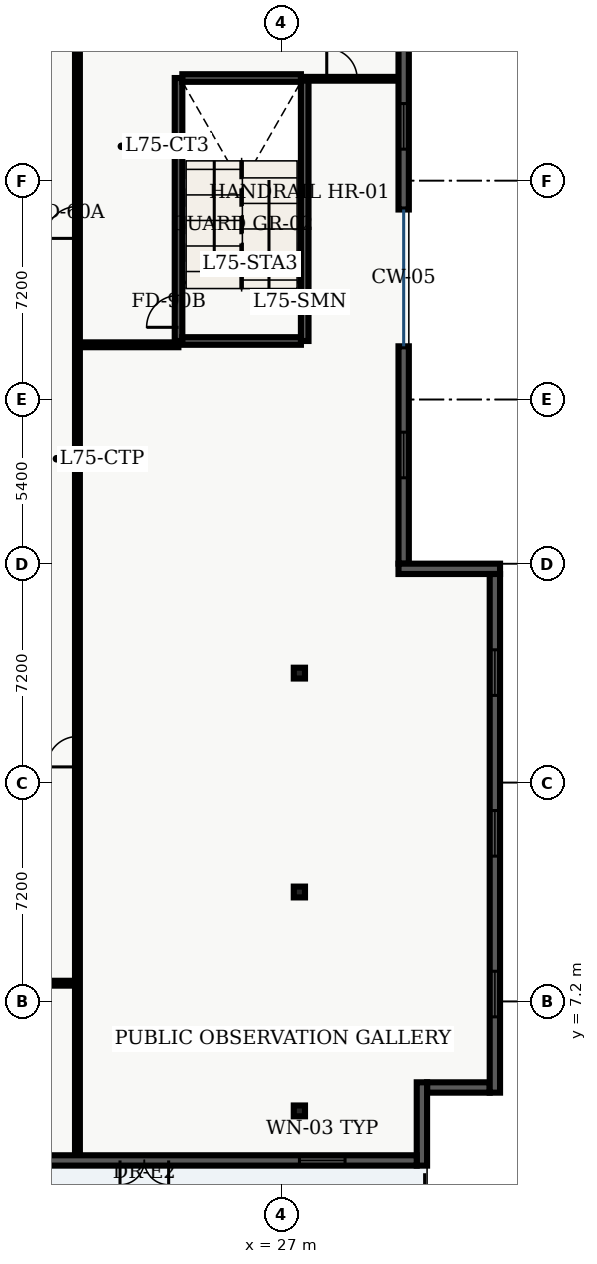
"""IFC4 building model, lengths in metres.
Left out: names, types, materials, properties, quantities, classifications, styles, units other than length and angle.
Written with IfcOpenShell. Run it as: python <this file> out.ifc"""

import sys

from ifc_helpers import new_model, entity, si_unit, converted_unit, direction, frame, origin_with_axes, origin_2d_with_axis, place, context, subcontext, project, spatial, polyline, rectangle, i_section, outline, extrude, element, fill, save


model = new_model("IFC4")
c1 = context("Model", 3, precision=1e-05, world=origin_with_axes(), true_north=direction((0.0, 1.0)))
c2 = subcontext(c1, "Body", "Model", "MODEL_VIEW")
j1 = project(units=[si_unit("LENGTHUNIT", "METRE"), converted_unit("PLANEANGLEUNIT", "DEGREE", entity("IfcPlaneAngleMeasure", 0.017), si_unit("PLANEANGLEUNIT", "RADIAN"), dimensions=[0, 0, 0, 0, 0, 0, 0])], contexts=[c1])
p1 = place(None, origin_with_axes())
s1 = spatial("IfcSite", under=j1, at=p1, CompositionType="ELEMENT")
p2 = place(p1, origin_with_axes())
s2 = spatial("IfcBuilding", under=s1, at=p2, CompositionType="ELEMENT")
p3 = place(p2, frame((0.0, 0.0, 303.6), z_axis=(0.0, 0.0, 1.0), x_axis=(1.0, 0.0, 0.0)))
s3 = spatial("IfcBuildingStorey", under=s2, at=p3, CompositionType="ELEMENT", Elevation=303.6)
p4 = place(p3, frame((23.625, 28.925, 0.0), z_axis=(0.0, 0.0, 1.0), x_axis=(0.0, 1.0, 0.0)))
e1 = element("IfcWall", 1, at=p4, inside=s3, PredefinedType="SHEAR", context=c2, shape_type="SweptSolid", body=[
    extrude(outline(polyline([(0.0, -0.125), (8.65, -0.125), (8.65, 0.125), (0.0, 0.125), (0.0, -0.125)])), origin_with_axes(), (0.0, 0.0, 1.0), 4.84),
])
p5 = place(p4, frame((0.975, 0.0, 0.0), z_axis=(0.0, 0.0, 1.0), x_axis=(1.0, 0.0, 0.0)))
e2 = element("IfcOpeningElement", 2, at=p5, cuts=e1, PredefinedType="OPENING", context=c2, shape_type="SweptSolid", body=[
    extrude(rectangle(XDim=1.05, YDim=0.27, at=origin_2d_with_axis()), origin_with_axes(), (0.0, 0.0, 1.0), 2.15),
])
p6 = place(p3, frame((27.775, 28.925, 0.0), z_axis=(0.0, 0.0, 1.0), x_axis=(0.0, 1.0, 0.0)))
e3 = element("IfcWall", 3, at=p6, inside=s3, PredefinedType="SHEAR", context=c2, shape_type="SweptSolid", body=[
    extrude(outline(polyline([(0.0, -0.125), (8.65, -0.125), (8.65, 0.125), (0.0, 0.125), (0.0, -0.125)])), origin_with_axes(), (0.0, 0.0, 1.0), 4.84),
])
for number, where, z_axis, x_axis in (
    (4, (23.75, 28.925, 0.0), (0.0, 0.0, 1.0), (1.0, 0.0, 0.0)),
    (5, (23.75, 37.575, 0.0), (0.0, 0.0, 1.0), (1.0, 0.0, 0.0)),
):
    element("IfcWall", number, at=place(p3, frame(where, z_axis=z_axis, x_axis=x_axis)), inside=s3, PredefinedType="SHEAR", context=c2, shape_type="SweptSolid", body=[
        extrude(outline(polyline([(0.0, -0.125), (3.9, -0.125), (3.9, 0.125), (0.0, 0.125), (0.0, -0.125)])), origin_with_axes(), (0.0, 0.0, 1.0), 4.84),
    ])
for number, where, z_axis, x_axis in (
    (6, (27.6, 3.6, 0.0), (0.0, 0.0, 1.0), (1.0, 0.0, 0.0)),
    (7, (27.6, 10.8, 0.0), (0.0, 0.0, 1.0), (1.0, 0.0, 0.0)),
    (8, (27.6, 18.0, 0.0), (0.0, 0.0, 1.0), (1.0, 0.0, 0.0)),
):
    element("IfcColumn", number, at=place(p3, frame(where, z_axis=z_axis, x_axis=x_axis)), inside=s3, PredefinedType="COLUMN", context=c2, shape_type="SweptSolid", body=[
        extrude(i_section(OverallWidth=0.369, OverallDepth=0.356, WebThickness=0.011, FlangeThickness=0.018, FilletRadius=0.018, at=origin_2d_with_axis()), origin_with_axes(), (0.0, 0.0, 1.0), 5.1),
    ])
p7 = place(p3, frame((8.135, 7.8, 0.0), z_axis=(0.0, 0.0, 1.0), x_axis=(1.0, 0.0, 0.0)))
e9 = element("IfcWall", 9, at=p7, inside=s3, PredefinedType="PARTITIONING", context=c2, shape_type="SweptSolid", body=[
    extrude(outline(polyline([(0.0, -0.08), (12.165, -0.08), (12.165, 0.08), (0.0, 0.08), (0.0, -0.08)])), origin_with_axes(), (0.0, 0.0, 1.0), 3.2),
])
p8 = place(p7, frame((6.065, 0.0, 0.0), z_axis=(0.0, 0.0, 1.0), x_axis=(1.0, 0.0, 0.0)))
e10 = element("IfcOpeningElement", 10, at=p8, cuts=e9, PredefinedType="OPENING", context=c2, shape_type="SweptSolid", body=[
    extrude(rectangle(XDim=1.0, YDim=0.18, at=origin_2d_with_axis()), origin_with_axes(), (0.0, 0.0, 1.0), 2.15),
])
p9 = place(p3, frame((20.3, 2.14, 0.0), z_axis=(0.0, 0.0, 1.0), x_axis=(0.0, 1.0, 0.0)))
e11 = element("IfcWall", 11, at=p9, inside=s3, PredefinedType="PARTITIONING", context=c2, shape_type="SweptSolid", body=[
    extrude(outline(polyline([(0.0, -0.08), (38.36, -0.08), (38.36, 0.08), (0.0, 0.08), (0.0, -0.08)])), origin_with_axes(), (0.0, 0.0, 1.0), 3.2),
])
p10 = place(p9, frame((30.685, 0.0, 0.0), z_axis=(0.0, 0.0, 1.0), x_axis=(1.0, 0.0, 0.0)))
e12 = element("IfcOpeningElement", 12, at=p10, cuts=e11, PredefinedType="OPENING", context=c2, shape_type="SweptSolid", body=[
    extrude(rectangle(XDim=1.05, YDim=0.18, at=origin_2d_with_axis()), origin_with_axes(), (0.0, 0.0, 1.0), 2.15),
])
p11 = place(p9, frame((13.275, 0.0, 0.0), z_axis=(0.0, 0.0, 1.0), x_axis=(1.0, 0.0, 0.0)))
e13 = element("IfcOpeningElement", 13, at=p11, cuts=e11, PredefinedType="OPENING", context=c2, shape_type="SweptSolid", body=[
    extrude(rectangle(XDim=1.0, YDim=0.18, at=origin_2d_with_axis()), origin_with_axes(), (0.0, 0.0, 1.0), 2.15),
])
p12 = place(p3, frame((20.3, 28.8, 0.0), z_axis=(0.0, 0.0, 1.0), x_axis=(1.0, 0.0, 0.0)))
e14 = element("IfcWall", 14, at=p12, inside=s3, PredefinedType="PARTITIONING", context=c2, shape_type="SweptSolid", body=[
    extrude(outline(polyline([(0.0, -0.08), (3.32, -0.08), (3.32, 0.08), (0.0, 0.08), (0.0, -0.08)])), origin_with_axes(), (0.0, 0.0, 1.0), 3.2),
])
p13 = place(p3, frame((27.85, 37.55, 0.0), z_axis=(0.0, 0.0, 1.0), x_axis=(1.0, 0.0, 0.0)))
e15 = element("IfcWall", 15, at=p13, inside=s3, PredefinedType="PARTITIONING", context=c2, shape_type="SweptSolid", body=[
    extrude(outline(polyline([(0.0, -0.062), (3.015, -0.062), (3.015, 0.062), (0.0, 0.062), (0.0, -0.062)])), origin_with_axes(), (0.0, 0.0, 1.0), 3.2),
])
p14 = place(p13, frame((1.15, 0.0, 0.0), z_axis=(0.0, 0.0, 1.0), x_axis=(1.0, 0.0, 0.0)))
e16 = element("IfcOpeningElement", 16, at=p14, cuts=e15, PredefinedType="OPENING", context=c2, shape_type="SweptSolid", body=[
    extrude(rectangle(XDim=1.0, YDim=0.145, at=origin_2d_with_axis()), origin_with_axes(), (0.0, 0.0, 1.0), 2.15),
])
p15 = place(p3, frame((33.86, 4.37, 0.0), z_axis=(0.0, 0.0, 1.0), x_axis=(-1.0, 0.0, 0.0)))
e17 = element("IfcWall", 17, at=p15, inside=s3, PredefinedType="SOLIDWALL", context=c2, shape_type="SweptSolid", body=[
    extrude(outline(polyline([(0.0, -0.17), (2.06, -0.17), (2.06, 0.17), (0.0, 0.17), (0.0, -0.17)])), origin_with_axes(), (0.0, 0.0, 1.0), 4.84),
])
p16 = place(p3, frame((31.63, 4.54, 0.0), z_axis=(0.0, 0.0, 1.0), x_axis=(0.0, -1.0, 0.0)))
e18 = element("IfcWall", 18, at=p16, inside=s3, PredefinedType="SOLIDWALL", context=c2, shape_type="SweptSolid", body=[
    extrude(outline(polyline([(0.0, -0.17), (2.74, -0.17), (2.74, 0.17), (0.0, 0.17), (0.0, -0.17)])), origin_with_axes(), (0.0, 0.0, 1.0), 4.84),
])
p17 = place(p3, frame((31.46, 1.97, 0.0), z_axis=(0.0, 0.0, 1.0), x_axis=(-1.0, 0.0, 0.0)))
e19 = element("IfcWall", 19, at=p17, inside=s3, PredefinedType="SOLIDWALL", context=c2, shape_type="SweptSolid", body=[
    extrude(outline(polyline([(0.0, -0.17), (21.26, -0.17), (21.26, 0.17), (0.0, 0.17), (0.0, -0.17)])), origin_with_axes(), (0.0, 0.0, 1.0), 4.84),
])
p18 = place(p17, frame((8.96, 0.0, 0.0), z_axis=(0.0, 0.0, 1.0), x_axis=(1.0, 0.0, 0.0)))
e20 = element("IfcOpeningElement", 20, at=p18, cuts=e19, PredefinedType="OPENING", context=c2, shape_type="SweptSolid", body=[
    extrude(rectangle(XDim=1.6, YDim=0.36, at=origin_2d_with_axis()), origin_with_axes(), (0.0, 0.0, 1.0), 2.2),
])
p19 = place(p17, frame((3.108, 0.0, 0.45), z_axis=(0.0, 0.0, 1.0), x_axis=(1.0, 0.0, 0.0)))
e21 = element("IfcOpeningElement", 21, at=p19, cuts=e19, PredefinedType="OPENING", context=c2, shape_type="SweptSolid", body=[
    extrude(rectangle(XDim=1.5, YDim=0.36, at=origin_2d_with_axis()), origin_with_axes(), (0.0, 0.0, 1.0), 2.1),
])
p20 = place(p17, frame((13.138, 0.0, 0.45), z_axis=(0.0, 0.0, 1.0), x_axis=(1.0, 0.0, 0.0)))
e22 = element("IfcOpeningElement", 22, at=p20, cuts=e19, PredefinedType="OPENING", context=c2, shape_type="SweptSolid", body=[
    extrude(rectangle(XDim=1.5, YDim=0.36, at=origin_2d_with_axis()), origin_with_axes(), (0.0, 0.0, 1.0), 2.1),
])
p21 = place(p17, frame((18.153, 0.0, 0.45), z_axis=(0.0, 0.0, 1.0), x_axis=(1.0, 0.0, 0.0)))
e23 = element("IfcOpeningElement", 23, at=p21, cuts=e19, PredefinedType="OPENING", context=c2, shape_type="SweptSolid", body=[
    extrude(rectangle(XDim=1.5, YDim=0.36, at=origin_2d_with_axis()), origin_with_axes(), (0.0, 0.0, 1.0), 2.1),
])
p22 = place(p3, frame((31.03, 40.42, 0.0), z_axis=(0.0, 0.0, 1.0), x_axis=(0.0, -1.0, 0.0)))
e24 = element("IfcWall", 24, at=p22, inside=s3, PredefinedType="SOLIDWALL", context=c2, shape_type="SweptSolid", body=[
    extrude(outline(polyline([(0.0, -0.17), (7.17, -0.17), (7.17, 0.17), (0.0, 0.17), (0.0, -0.17)])), origin_with_axes(), (0.0, 0.0, 1.0), 4.84),
])
p23 = place(p22, frame((4.435, 0.0, 0.45), z_axis=(0.0, 0.0, 1.0), x_axis=(1.0, 0.0, 0.0)))
e25 = element("IfcOpeningElement", 25, at=p23, cuts=e24, PredefinedType="OPENING", context=c2, shape_type="SweptSolid", body=[
    extrude(rectangle(XDim=1.5, YDim=0.36, at=origin_2d_with_axis()), origin_with_axes(), (0.0, 0.0, 1.0), 2.1),
])
p24 = place(p3, frame((31.03, 28.75, 0.0), z_axis=(0.0, 0.0, 1.0), x_axis=(0.0, -1.0, 0.0)))
e26 = element("IfcWall", 26, at=p24, inside=s3, PredefinedType="SOLIDWALL", context=c2, shape_type="SweptSolid", body=[
    extrude(outline(polyline([(0.0, -0.17), (7.15, -0.17), (7.15, 0.17), (0.0, 0.17), (0.0, -0.17)])), origin_with_axes(), (0.0, 0.0, 1.0), 4.84),
])
p25 = place(p24, frame((3.575, 0.0, 0.45), z_axis=(0.0, 0.0, 1.0), x_axis=(1.0, 0.0, 0.0)))
e27 = element("IfcOpeningElement", 27, at=p25, cuts=e26, PredefinedType="OPENING", context=c2, shape_type="SweptSolid", body=[
    extrude(rectangle(XDim=1.5, YDim=0.36, at=origin_2d_with_axis()), origin_with_axes(), (0.0, 0.0, 1.0), 2.1),
])
p26 = place(p3, frame((30.86, 21.43, 0.0), z_axis=(0.0, 0.0, 1.0), x_axis=(1.0, 0.0, 0.0)))
e28 = element("IfcWall", 28, at=p26, inside=s3, PredefinedType="SOLIDWALL", context=c2, shape_type="SweptSolid", body=[
    extrude(outline(polyline([(0.0, -0.17), (3.34, -0.17), (3.34, 0.17), (0.0, 0.17), (0.0, -0.17)])), origin_with_axes(), (0.0, 0.0, 1.0), 4.84),
])
p27 = place(p3, frame((34.03, 21.26, 0.0), z_axis=(0.0, 0.0, 1.0), x_axis=(0.0, -1.0, 0.0)))
e29 = element("IfcWall", 29, at=p27, inside=s3, PredefinedType="SOLIDWALL", context=c2, shape_type="SweptSolid", body=[
    extrude(outline(polyline([(0.0, -0.17), (17.06, -0.17), (17.06, 0.17), (0.0, 0.17), (0.0, -0.17)])), origin_with_axes(), (0.0, 0.0, 1.0), 4.84),
])
p28 = place(p27, frame((3.243, 0.0, 0.45), z_axis=(0.0, 0.0, 1.0), x_axis=(1.0, 0.0, 0.0)))
e30 = element("IfcOpeningElement", 30, at=p28, cuts=e29, PredefinedType="OPENING", context=c2, shape_type="SweptSolid", body=[
    extrude(rectangle(XDim=1.5, YDim=0.36, at=origin_2d_with_axis()), origin_with_axes(), (0.0, 0.0, 1.0), 2.1),
])
p29 = place(p27, frame((8.53, 0.0, 0.45), z_axis=(0.0, 0.0, 1.0), x_axis=(1.0, 0.0, 0.0)))
e31 = element("IfcOpeningElement", 31, at=p29, cuts=e29, PredefinedType="OPENING", context=c2, shape_type="SweptSolid", body=[
    extrude(rectangle(XDim=1.5, YDim=0.36, at=origin_2d_with_axis()), origin_with_axes(), (0.0, 0.0, 1.0), 2.1),
])
p30 = place(p27, frame((13.817, 0.0, 0.45), z_axis=(0.0, 0.0, 1.0), x_axis=(1.0, 0.0, 0.0)))
e32 = element("IfcOpeningElement", 32, at=p30, cuts=e29, PredefinedType="OPENING", context=c2, shape_type="SweptSolid", body=[
    extrude(rectangle(XDim=1.5, YDim=0.36, at=origin_2d_with_axis()), origin_with_axes(), (0.0, 0.0, 1.0), 2.1),
])
p31 = place(p4, frame((0.975, 0.0, 0.0), z_axis=(0.0, 0.0, 1.0), x_axis=(1.0, 0.0, 0.0)))
e33 = element("IfcDoor", 33, at=p31, inside=s3, OperationType="SINGLE_SWING_LEFT", PredefinedType="DOOR", context=c2, shape_type="SweptSolid", body=[
    extrude(rectangle(XDim=1.05, YDim=0.09, at=origin_2d_with_axis()), origin_with_axes(), (0.0, 0.0, 1.0), 2.15),
])
fill(e2, e33)
p32 = place(p9, frame((30.685, 0.0, 0.0), z_axis=(0.0, 0.0, 1.0), x_axis=(1.0, 0.0, 0.0)))
e34 = element("IfcDoor", 34, at=p32, inside=s3, OperationType="SINGLE_SWING_LEFT", PredefinedType="DOOR", context=c2, shape_type="SweptSolid", body=[
    extrude(rectangle(XDim=1.05, YDim=0.09, at=origin_2d_with_axis()), origin_with_axes(), (0.0, 0.0, 1.0), 2.15),
])
fill(e12, e34)
p33 = place(p9, frame((13.275, 0.0, 0.0), z_axis=(0.0, 0.0, 1.0), x_axis=(1.0, 0.0, 0.0)))
e35 = element("IfcDoor", 35, at=p33, inside=s3, OperationType="SINGLE_SWING_LEFT", PredefinedType="DOOR", context=c2, shape_type="SweptSolid", body=[
    extrude(rectangle(XDim=1.0, YDim=0.09, at=origin_2d_with_axis()), origin_with_axes(), (0.0, 0.0, 1.0), 2.15),
])
fill(e13, e35)
p34 = place(p13, frame((1.15, 0.0, 0.0), z_axis=(0.0, 0.0, 1.0), x_axis=(1.0, 0.0, 0.0)))
e36 = element("IfcDoor", 36, at=p34, inside=s3, OperationType="SINGLE_SWING_LEFT", PredefinedType="DOOR", context=c2, shape_type="SweptSolid", body=[
    extrude(rectangle(XDim=1.0, YDim=0.075, at=origin_2d_with_axis()), origin_with_axes(), (0.0, 0.0, 1.0), 2.15),
])
fill(e16, e36)
p35 = place(p17, frame((8.96, 0.0, 0.0), z_axis=(0.0, 0.0, 1.0), x_axis=(1.0, 0.0, 0.0)))
e37 = element("IfcDoor", 37, at=p35, inside=s3, OperationType="DOUBLE_DOOR_SINGLE_SWING", PredefinedType="DOOR", context=c2, shape_type="SweptSolid", body=[
    extrude(rectangle(XDim=1.6, YDim=0.09, at=origin_2d_with_axis()), origin_with_axes(), (0.0, 0.0, 1.0), 2.2),
])
fill(e20, e37)
p36 = place(p17, frame((3.108, 0.0, 0.45), z_axis=(0.0, 0.0, 1.0), x_axis=(1.0, 0.0, 0.0)))
e38 = element("IfcWindow", 38, at=p36, inside=s3, PredefinedType="WINDOW", context=c2, shape_type="SweptSolid", body=[
    extrude(rectangle(XDim=1.5, YDim=0.09, at=origin_2d_with_axis()), origin_with_axes(), (0.0, 0.0, 1.0), 2.1),
])
fill(e21, e38)
p37 = place(p22, frame((4.435, 0.0, 0.45), z_axis=(0.0, 0.0, 1.0), x_axis=(1.0, 0.0, 0.0)))
e39 = element("IfcWindow", 39, at=p37, inside=s3, PredefinedType="WINDOW", context=c2, shape_type="SweptSolid", body=[
    extrude(rectangle(XDim=1.5, YDim=0.09, at=origin_2d_with_axis()), origin_with_axes(), (0.0, 0.0, 1.0), 2.1),
])
fill(e25, e39)
p38 = place(p24, frame((3.575, 0.0, 0.45), z_axis=(0.0, 0.0, 1.0), x_axis=(1.0, 0.0, 0.0)))
e40 = element("IfcWindow", 40, at=p38, inside=s3, PredefinedType="WINDOW", context=c2, shape_type="SweptSolid", body=[
    extrude(rectangle(XDim=1.5, YDim=0.09, at=origin_2d_with_axis()), origin_with_axes(), (0.0, 0.0, 1.0), 2.1),
])
fill(e27, e40)
p39 = place(p27, frame((3.243, 0.0, 0.45), z_axis=(0.0, 0.0, 1.0), x_axis=(1.0, 0.0, 0.0)))
e41 = element("IfcWindow", 41, at=p39, inside=s3, PredefinedType="WINDOW", context=c2, shape_type="SweptSolid", body=[
    extrude(rectangle(XDim=1.5, YDim=0.09, at=origin_2d_with_axis()), origin_with_axes(), (0.0, 0.0, 1.0), 2.1),
])
fill(e30, e41)
p40 = place(p27, frame((8.53, 0.0, 0.45), z_axis=(0.0, 0.0, 1.0), x_axis=(1.0, 0.0, 0.0)))
e42 = element("IfcWindow", 42, at=p40, inside=s3, PredefinedType="WINDOW", context=c2, shape_type="SweptSolid", body=[
    extrude(rectangle(XDim=1.5, YDim=0.09, at=origin_2d_with_axis()), origin_with_axes(), (0.0, 0.0, 1.0), 2.1),
])
fill(e31, e42)
p41 = place(p27, frame((13.817, 0.0, 0.45), z_axis=(0.0, 0.0, 1.0), x_axis=(1.0, 0.0, 0.0)))
e43 = element("IfcWindow", 43, at=p41, inside=s3, PredefinedType="WINDOW", context=c2, shape_type="SweptSolid", body=[
    extrude(rectangle(XDim=1.5, YDim=0.09, at=origin_2d_with_axis()), origin_with_axes(), (0.0, 0.0, 1.0), 2.1),
])
fill(e32, e43)
save(model, sys.argv[1])
